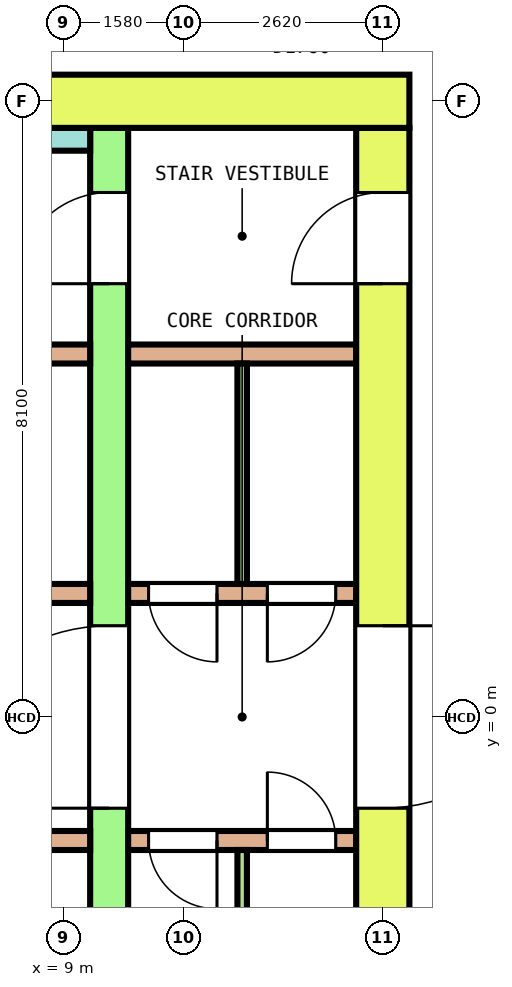
"""IFC4 building model, lengths in metres.
Left out: names, types, materials, properties, quantities, classifications, styles, units other than length and angle.
Written with IfcOpenShell. Run it as: python <this file> out.ifc"""

import sys

from ifc_helpers import new_model, si_unit, direction, frame, frame_2d, origin, place, context, subcontext, project, spatial, rectangle, extrude, element, fill, save


model = new_model("IFC4")
c1 = context("Model", 3, precision=1e-05, world=origin(), true_north=direction((0.0, 1.0)))
c2 = subcontext(c1, "Body", "Model", "MODEL_VIEW")
j1 = project(units=[si_unit("LENGTHUNIT", "METRE"), si_unit("PLANEANGLEUNIT", "RADIAN")], contexts=[c1])
p1 = place(None, origin())
s1 = spatial("IfcSite", under=j1, at=p1, CompositionType="ELEMENT")
p2 = place(p1, origin())
s2 = spatial("IfcBuilding", under=s1, at=p2, CompositionType="ELEMENT")
p3 = place(p2, frame((0.0, 0.0, 162.8)))
s3 = spatial("IfcBuildingStorey", under=s2, at=p3, CompositionType="ELEMENT", Elevation=162.8)
p4 = place(p3, frame((-13.55, 8.1, 0.0), z_axis=(0.0, 0.0, 1.0), x_axis=(1.0, 0.0, 0.0)))
e1 = element("IfcWall", 1, at=p4, inside=s3, PredefinedType="SHEAR", context=c2, shape_type="SweptSolid", body=[
    extrude(rectangle(XDim=27.1, YDim=0.7, at=frame_2d((13.55, 0.0))), origin(), (0.0, 0.0, 1.0), 4.1),
])
p5 = place(p4, frame((14.475, 0.0, 0.0)))
e2 = element("IfcOpeningElement", 2, at=p5, cuts=e1, PredefinedType="OPENING", context=c2, shape_type="SweptSolid", body=[
    extrude(rectangle(XDim=1.4, YDim=2.1, at=frame_2d((0.7, 1.05))), frame((0.0, 0.36, 0.0), z_axis=(0.0, -1.0, 0.0), x_axis=(1.0, 0.0, 0.0)), (0.0, 0.0, 1.0), 0.72),
])
p6 = place(p3, frame((13.2, -7.75, 0.0), z_axis=(0.0, 0.0, 1.0), x_axis=(0.0, 1.0, 0.0)))
e3 = element("IfcWall", 3, at=p6, inside=s3, PredefinedType="SHEAR", context=c2, shape_type="SweptSolid", body=[
    extrude(rectangle(XDim=15.5, YDim=0.7, at=frame_2d((7.75, 0.0))), origin(), (0.0, 0.0, 1.0), 4.1),
])
p7 = place(p6, frame((6.55, 0.0, 0.0)))
e4 = element("IfcOpeningElement", 4, at=p7, cuts=e3, PredefinedType="OPENING", context=c2, shape_type="SweptSolid", body=[
    extrude(rectangle(XDim=2.4, YDim=2.1, at=frame_2d((1.2, 1.05))), frame((0.0, 0.36, 0.0), z_axis=(0.0, -1.0, 0.0), x_axis=(1.0, 0.0, 0.0)), (0.0, 0.0, 1.0), 0.72),
])
p8 = place(p6, frame((13.45, 0.0, 0.0)))
e5 = element("IfcOpeningElement", 5, at=p8, cuts=e3, PredefinedType="OPENING", context=c2, shape_type="SweptSolid", body=[
    extrude(rectangle(XDim=1.2, YDim=2.1, at=frame_2d((0.6, 1.05))), frame((0.0, 0.36, 0.0), z_axis=(0.0, -1.0, 0.0), x_axis=(1.0, 0.0, 0.0)), (0.0, 0.0, 1.0), 0.72),
])
p9 = place(p6, frame((0.95, 0.0, 0.0)))
e6 = element("IfcOpeningElement", 6, at=p9, cuts=e3, PredefinedType="OPENING", context=c2, shape_type="SweptSolid", body=[
    extrude(rectangle(XDim=1.0, YDim=2.1, at=frame_2d((0.5, 1.05))), frame((0.0, 0.36, 0.0), z_axis=(0.0, -1.0, 0.0), x_axis=(1.0, 0.0, 0.0)), (0.0, 0.0, 1.0), 0.72),
])
p10 = place(p3, frame((9.6, -7.75, 0.0), z_axis=(0.0, 0.0, 1.0), x_axis=(0.0, 1.0, 0.0)))
e7 = element("IfcWall", 7, at=p10, inside=s3, PredefinedType="SHEAR", context=c2, shape_type="SweptSolid", body=[
    extrude(rectangle(XDim=15.5, YDim=0.5, at=frame_2d((7.75, 0.0))), origin(), (0.0, 0.0, 1.0), 4.1),
])
p11 = place(p10, frame((6.55, 0.0, 0.0)))
e8 = element("IfcOpeningElement", 8, at=p11, cuts=e7, PredefinedType="OPENING", context=c2, shape_type="SweptSolid", body=[
    extrude(rectangle(XDim=2.4, YDim=2.1, at=frame_2d((1.2, 1.05))), frame((0.0, 0.26, 0.0), z_axis=(0.0, -1.0, 0.0), x_axis=(1.0, 0.0, 0.0)), (0.0, 0.0, 1.0), 0.52),
])
p12 = place(p10, frame((13.45, 0.0, 0.0)))
e9 = element("IfcOpeningElement", 9, at=p12, cuts=e7, PredefinedType="OPENING", context=c2, shape_type="SweptSolid", body=[
    extrude(rectangle(XDim=1.2, YDim=2.1, at=frame_2d((0.6, 1.05))), frame((0.0, 0.26, 0.0), z_axis=(0.0, -1.0, 0.0), x_axis=(1.0, 0.0, 0.0)), (0.0, 0.0, 1.0), 0.52),
])
p13 = place(p10, frame((0.95, 0.0, 0.0)))
e10 = element("IfcOpeningElement", 10, at=p13, cuts=e7, PredefinedType="OPENING", context=c2, shape_type="SweptSolid", body=[
    extrude(rectangle(XDim=1.0, YDim=2.1, at=frame_2d((0.5, 1.05))), frame((0.0, 0.26, 0.0), z_axis=(0.0, -1.0, 0.0), x_axis=(1.0, 0.0, 0.0)), (0.0, 0.0, 1.0), 0.52),
])
p14 = place(p3, frame((-9.35, 1.625, 0.0), z_axis=(0.0, 0.0, 1.0), x_axis=(1.0, 0.0, 0.0)))
e11 = element("IfcWall", 11, at=p14, inside=s3, PredefinedType="SOLIDWALL", context=c2, shape_type="SweptSolid", body=[
    extrude(rectangle(XDim=18.7, YDim=0.25, at=frame_2d((9.35, 0.0))), origin(), (0.0, 0.0, 1.0), 4.1),
])
p15 = place(p14, frame((2.85, 0.0, 0.0)))
e12 = element("IfcOpeningElement", 12, at=p15, cuts=e11, PredefinedType="OPENING", context=c2, shape_type="SweptSolid", body=[
    extrude(rectangle(XDim=1.1, YDim=2.1, at=frame_2d((0.55, 1.05))), frame((0.0, 0.135, 0.0), z_axis=(0.0, -1.0, 0.0), x_axis=(1.0, 0.0, 0.0)), (0.0, 0.0, 1.0), 0.27),
])
p16 = place(p14, frame((5.15, 0.0, 0.0)))
e13 = element("IfcOpeningElement", 13, at=p16, cuts=e11, PredefinedType="OPENING", context=c2, shape_type="SweptSolid", body=[
    extrude(rectangle(XDim=1.1, YDim=2.1, at=frame_2d((0.55, 1.05))), frame((0.0, 0.135, 0.0), z_axis=(0.0, -1.0, 0.0), x_axis=(1.0, 0.0, 0.0)), (0.0, 0.0, 1.0), 0.27),
])
p17 = place(p14, frame((14.8, 0.0, 0.0)))
e14 = element("IfcOpeningElement", 14, at=p17, cuts=e11, PredefinedType="OPENING", context=c2, shape_type="SweptSolid", body=[
    extrude(rectangle(XDim=1.1, YDim=2.1, at=frame_2d((0.55, 1.05))), frame((0.0, 0.135, 0.0), z_axis=(0.0, -1.0, 0.0), x_axis=(1.0, 0.0, 0.0)), (0.0, 0.0, 1.0), 0.27),
])
p18 = place(p14, frame((0.575, 0.0, 0.0)))
e15 = element("IfcOpeningElement", 15, at=p18, cuts=e11, PredefinedType="OPENING", context=c2, shape_type="SweptSolid", body=[
    extrude(rectangle(XDim=0.9, YDim=2.1, at=frame_2d((0.45, 1.05))), frame((0.0, 0.135, 0.0), z_axis=(0.0, -1.0, 0.0), x_axis=(1.0, 0.0, 0.0)), (0.0, 0.0, 1.0), 0.27),
])
p19 = place(p14, frame((17.225, 0.0, 0.0)))
e16 = element("IfcOpeningElement", 16, at=p19, cuts=e11, PredefinedType="OPENING", context=c2, shape_type="SweptSolid", body=[
    extrude(rectangle(XDim=0.9, YDim=2.1, at=frame_2d((0.45, 1.05))), frame((0.0, 0.135, 0.0), z_axis=(0.0, -1.0, 0.0), x_axis=(1.0, 0.0, 0.0)), (0.0, 0.0, 1.0), 0.27),
])
p20 = place(p3, frame((9.85, 1.625, 0.0), z_axis=(0.0, 0.0, 1.0), x_axis=(1.0, 0.0, 0.0)))
e17 = element("IfcWall", 17, at=p20, inside=s3, PredefinedType="SOLIDWALL", context=c2, shape_type="SweptSolid", body=[
    extrude(rectangle(XDim=3.0, YDim=0.25, at=frame_2d((1.5, 0.0))), origin(), (0.0, 0.0, 1.0), 4.1),
])
p21 = place(p20, frame((0.269, 0.0, 0.0)))
e18 = element("IfcOpeningElement", 18, at=p21, cuts=e17, PredefinedType="OPENING", context=c2, shape_type="SweptSolid", body=[
    extrude(rectangle(XDim=0.9, YDim=2.1, at=frame_2d((0.45, 1.05))), frame((0.0, 0.135, 0.0), z_axis=(0.0, -1.0, 0.0), x_axis=(1.0, 0.0, 0.0)), (0.0, 0.0, 1.0), 0.27),
])
p22 = place(p20, frame((1.831, 0.0, 0.0)))
e19 = element("IfcOpeningElement", 19, at=p22, cuts=e17, PredefinedType="OPENING", context=c2, shape_type="SweptSolid", body=[
    extrude(rectangle(XDim=0.9, YDim=2.1, at=frame_2d((0.45, 1.05))), frame((0.0, 0.135, 0.0), z_axis=(0.0, -1.0, 0.0), x_axis=(1.0, 0.0, 0.0)), (0.0, 0.0, 1.0), 0.27),
])
p23 = place(p3, frame((-9.35, 4.775, 0.0), z_axis=(0.0, 0.0, 1.0), x_axis=(1.0, 0.0, 0.0)))
e20 = element("IfcWall", 20, at=p23, inside=s3, PredefinedType="SOLIDWALL", context=c2, shape_type="SweptSolid", body=[
    extrude(rectangle(XDim=18.7, YDim=0.25, at=frame_2d((9.35, 0.0))), origin(), (0.0, 0.0, 1.0), 4.1),
])
p24 = place(p3, frame((9.85, 4.775, 0.0), z_axis=(0.0, 0.0, 1.0), x_axis=(1.0, 0.0, 0.0)))
e21 = element("IfcWall", 21, at=p24, inside=s3, PredefinedType="SOLIDWALL", context=c2, shape_type="SweptSolid", body=[
    extrude(rectangle(XDim=3.0, YDim=0.25, at=frame_2d((1.5, 0.0))), origin(), (0.0, 0.0, 1.0), 4.1),
])
p25 = place(p3, frame((-9.35, -1.625, 0.0), z_axis=(0.0, 0.0, 1.0), x_axis=(1.0, 0.0, 0.0)))
e22 = element("IfcWall", 22, at=p25, inside=s3, PredefinedType="SOLIDWALL", context=c2, shape_type="SweptSolid", body=[
    extrude(rectangle(XDim=18.7, YDim=0.25, at=frame_2d((9.35, 0.0))), origin(), (0.0, 0.0, 1.0), 4.1),
])
p26 = place(p25, frame((2.85, 0.0, 0.0)))
e23 = element("IfcOpeningElement", 23, at=p26, cuts=e22, PredefinedType="OPENING", context=c2, shape_type="SweptSolid", body=[
    extrude(rectangle(XDim=1.1, YDim=2.1, at=frame_2d((0.55, 1.05))), frame((0.0, 0.135, 0.0), z_axis=(0.0, -1.0, 0.0), x_axis=(1.0, 0.0, 0.0)), (0.0, 0.0, 1.0), 0.27),
])
p27 = place(p25, frame((5.15, 0.0, 0.0)))
e24 = element("IfcOpeningElement", 24, at=p27, cuts=e22, PredefinedType="OPENING", context=c2, shape_type="SweptSolid", body=[
    extrude(rectangle(XDim=1.1, YDim=2.1, at=frame_2d((0.55, 1.05))), frame((0.0, 0.135, 0.0), z_axis=(0.0, -1.0, 0.0), x_axis=(1.0, 0.0, 0.0)), (0.0, 0.0, 1.0), 0.27),
])
p28 = place(p25, frame((14.8, 0.0, 0.0)))
e25 = element("IfcOpeningElement", 25, at=p28, cuts=e22, PredefinedType="OPENING", context=c2, shape_type="SweptSolid", body=[
    extrude(rectangle(XDim=1.1, YDim=2.1, at=frame_2d((0.55, 1.05))), frame((0.0, 0.135, 0.0), z_axis=(0.0, -1.0, 0.0), x_axis=(1.0, 0.0, 0.0)), (0.0, 0.0, 1.0), 0.27),
])
p29 = place(p25, frame((0.575, 0.0, 0.0)))
e26 = element("IfcOpeningElement", 26, at=p29, cuts=e22, PredefinedType="OPENING", context=c2, shape_type="SweptSolid", body=[
    extrude(rectangle(XDim=0.9, YDim=2.1, at=frame_2d((0.45, 1.05))), frame((0.0, 0.135, 0.0), z_axis=(0.0, -1.0, 0.0), x_axis=(1.0, 0.0, 0.0)), (0.0, 0.0, 1.0), 0.27),
])
p30 = place(p25, frame((17.225, 0.0, 0.0)))
e27 = element("IfcOpeningElement", 27, at=p30, cuts=e22, PredefinedType="OPENING", context=c2, shape_type="SweptSolid", body=[
    extrude(rectangle(XDim=0.9, YDim=2.1, at=frame_2d((0.45, 1.05))), frame((0.0, 0.135, 0.0), z_axis=(0.0, -1.0, 0.0), x_axis=(1.0, 0.0, 0.0)), (0.0, 0.0, 1.0), 0.27),
])
p31 = place(p3, frame((9.85, -1.625, 0.0), z_axis=(0.0, 0.0, 1.0), x_axis=(1.0, 0.0, 0.0)))
e28 = element("IfcWall", 28, at=p31, inside=s3, PredefinedType="SOLIDWALL", context=c2, shape_type="SweptSolid", body=[
    extrude(rectangle(XDim=3.0, YDim=0.25, at=frame_2d((1.5, 0.0))), origin(), (0.0, 0.0, 1.0), 4.1),
])
p32 = place(p31, frame((0.269, 0.0, 0.0)))
e29 = element("IfcOpeningElement", 29, at=p32, cuts=e28, PredefinedType="OPENING", context=c2, shape_type="SweptSolid", body=[
    extrude(rectangle(XDim=0.9, YDim=2.1, at=frame_2d((0.45, 1.05))), frame((0.0, 0.135, 0.0), z_axis=(0.0, -1.0, 0.0), x_axis=(1.0, 0.0, 0.0)), (0.0, 0.0, 1.0), 0.27),
])
p33 = place(p31, frame((1.831, 0.0, 0.0)))
e30 = element("IfcOpeningElement", 30, at=p33, cuts=e28, PredefinedType="OPENING", context=c2, shape_type="SweptSolid", body=[
    extrude(rectangle(XDim=0.9, YDim=2.1, at=frame_2d((0.45, 1.05))), frame((0.0, 0.135, 0.0), z_axis=(0.0, -1.0, 0.0), x_axis=(1.0, 0.0, 0.0)), (0.0, 0.0, 1.0), 0.27),
])
p34 = place(p3, frame((3.55, 7.6, 0.0), z_axis=(0.0, 0.0, 1.0), x_axis=(1.0, 0.0, 0.0)))
e31 = element("IfcWall", 31, at=p34, inside=s3, PredefinedType="SOLIDWALL", context=c2, shape_type="SweptSolid", body=[
    extrude(rectangle(XDim=5.8, YDim=0.3, at=frame_2d((2.9, 0.0))), origin(), (0.0, 0.0, 1.0), 4.1),
])
for number, where, z_axis, x_axis in (
    (32, (11.35, 1.75, 0.0), (0.0, 0.0, 1.0), (0.0, 1.0, 0.0)),
    (33, (11.35, -4.65, 0.0), (0.0, 0.0, 1.0), (0.0, 1.0, 0.0)),
):
    element("IfcWall", number, at=place(p3, frame(where, z_axis=z_axis, x_axis=x_axis)), inside=s3, PredefinedType="PARTITIONING", context=c2, shape_type="SweptSolid", body=[
        extrude(rectangle(XDim=2.9, YDim=0.125, at=frame_2d((1.45, 0.0))), origin(), (0.0, 0.0, 1.0), 4.1),
    ])
p35 = place(p11, origin())
e34 = element("IfcDoor", 34, at=p35, inside=s3, OperationType="DOUBLE_DOOR_SINGLE_SWING", PredefinedType="DOOR", context=c2, shape_type="SweptSolid", body=[
    extrude(rectangle(XDim=2.4, YDim=2.1, at=frame_2d((1.2, 1.05))), frame((0.0, 0.2, 0.0), z_axis=(0.0, -1.0, 0.0), x_axis=(1.0, 0.0, 0.0)), (0.0, 0.0, 1.0), 0.4),
])
fill(e8, e34)
p36 = place(p7, origin())
e35 = element("IfcDoor", 35, at=p36, inside=s3, OperationType="DOUBLE_DOOR_SINGLE_SWING", PredefinedType="DOOR", context=c2, shape_type="SweptSolid", body=[
    extrude(rectangle(XDim=2.4, YDim=2.1, at=frame_2d((1.2, 1.05))), frame((0.0, 0.3, 0.0), z_axis=(0.0, -1.0, 0.0), x_axis=(1.0, 0.0, 0.0)), (0.0, 0.0, 1.0), 0.6),
])
fill(e4, e35)
p37 = place(p12, origin())
e36 = element("IfcDoor", 36, at=p37, inside=s3, OperationType="SINGLE_SWING_LEFT", PredefinedType="DOOR", context=c2, shape_type="SweptSolid", body=[
    extrude(rectangle(XDim=1.2, YDim=2.1, at=frame_2d((0.6, 1.05))), frame((0.0, 0.2, 0.0), z_axis=(0.0, -1.0, 0.0), x_axis=(1.0, 0.0, 0.0)), (0.0, 0.0, 1.0), 0.4),
])
fill(e9, e36)
p38 = place(p8, origin())
e37 = element("IfcDoor", 37, at=p38, inside=s3, OperationType="SINGLE_SWING_RIGHT", PredefinedType="DOOR", context=c2, shape_type="SweptSolid", body=[
    extrude(rectangle(XDim=1.2, YDim=2.1, at=frame_2d((0.6, 1.05))), frame((0.0, 0.3, 0.0), z_axis=(0.0, -1.0, 0.0), x_axis=(1.0, 0.0, 0.0)), (0.0, 0.0, 1.0), 0.6),
])
fill(e5, e37)
p39 = place(p21, origin())
e38 = element("IfcDoor", 38, at=p39, inside=s3, OperationType="SINGLE_SWING_LEFT", PredefinedType="DOOR", context=c2, shape_type="SweptSolid", body=[
    extrude(rectangle(XDim=0.9, YDim=2.1, at=frame_2d((0.45, 1.05))), frame((0.0, 0.075, 0.0), z_axis=(0.0, -1.0, 0.0), x_axis=(1.0, 0.0, 0.0)), (0.0, 0.0, 1.0), 0.15),
])
fill(e18, e38)
p40 = place(p22, origin())
e39 = element("IfcDoor", 39, at=p40, inside=s3, OperationType="SINGLE_SWING_RIGHT", PredefinedType="DOOR", context=c2, shape_type="SweptSolid", body=[
    extrude(rectangle(XDim=0.9, YDim=2.1, at=frame_2d((0.45, 1.05))), frame((0.0, 0.075, 0.0), z_axis=(0.0, -1.0, 0.0), x_axis=(1.0, 0.0, 0.0)), (0.0, 0.0, 1.0), 0.15),
])
fill(e19, e39)
p41 = place(p32, origin())
e40 = element("IfcDoor", 40, at=p41, inside=s3, OperationType="SINGLE_SWING_LEFT", PredefinedType="DOOR", context=c2, shape_type="SweptSolid", body=[
    extrude(rectangle(XDim=0.9, YDim=2.1, at=frame_2d((0.45, 1.05))), frame((0.0, 0.075, 0.0), z_axis=(0.0, -1.0, 0.0), x_axis=(1.0, 0.0, 0.0)), (0.0, 0.0, 1.0), 0.15),
])
fill(e29, e40)
p42 = place(p33, origin())
e41 = element("IfcDoor", 41, at=p42, inside=s3, OperationType="SINGLE_SWING_RIGHT", PredefinedType="DOOR", context=c2, shape_type="SweptSolid", body=[
    extrude(rectangle(XDim=0.9, YDim=2.1, at=frame_2d((0.45, 1.05))), frame((0.0, 0.075, 0.0), z_axis=(0.0, -1.0, 0.0), x_axis=(1.0, 0.0, 0.0)), (0.0, 0.0, 1.0), 0.15),
])
fill(e30, e41)
save(model, sys.argv[1])
